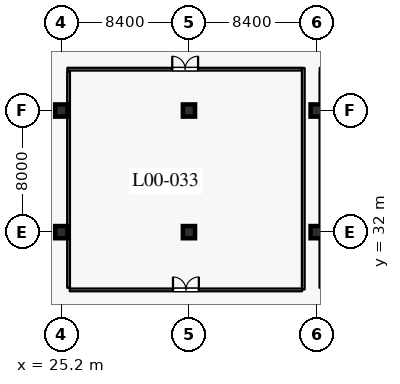
"""IFC4 building model, lengths in metres.
Left out: names, types, materials, properties, quantities, classifications, styles, units other than length and angle.
Written with IfcOpenShell. Run it as: python <this file> out.ifc"""

import sys

from ifc_helpers import new_model, si_unit, direction, frame, frame_2d, origin, origin_2d, place, context, subcontext, project, spatial, rectangle, extrude, element, fill, save


model = new_model("IFC4")
c1 = context("Model", 3, precision=1e-05, world=origin(), true_north=direction((0.0, 1.0)))
c2 = subcontext(c1, "Body", "Model", "MODEL_VIEW")
j1 = project(units=[si_unit("LENGTHUNIT", "METRE"), si_unit("PLANEANGLEUNIT", "RADIAN")], contexts=[c1])
p1 = place(None, origin())
s1 = spatial("IfcSite", under=j1, at=p1, CompositionType="ELEMENT")
p2 = place(p1, origin())
s2 = spatial("IfcBuilding", under=s1, at=p2, CompositionType="ELEMENT")
p3 = place(p2, origin())
s3 = spatial("IfcBuildingStorey", under=s2, at=p3, CompositionType="ELEMENT", Elevation=0.0)
for number, where, z_axis, x_axis in (
    (1, (25.2, 32.0, 0.0), (0.0, 0.0, 1.0), (1.0, 0.0, 0.0)),
    (2, (25.2, 40.0, 0.0), (0.0, 0.0, 1.0), (1.0, 0.0, 0.0)),
    (3, (33.6, 32.0, 0.0), (0.0, 0.0, 1.0), (1.0, 0.0, 0.0)),
    (4, (33.6, 40.0, 0.0), (0.0, 0.0, 1.0), (1.0, 0.0, 0.0)),
    (5, (42.0, 32.0, 0.0), (0.0, 0.0, 1.0), (1.0, 0.0, 0.0)),
    (6, (42.0, 40.0, 0.0), (0.0, 0.0, 1.0), (1.0, 0.0, 0.0)),
):
    element("IfcColumn", number, at=place(p3, frame(where, z_axis=z_axis, x_axis=x_axis)), inside=s3, PredefinedType="COLUMN", context=c2, shape_type="SweptSolid", body=[
        extrude(rectangle(XDim=0.8, YDim=0.8, at=origin_2d()), origin(), (0.0, 0.0, 1.0), 6.0),
    ])
p4 = place(p3, frame((25.76, 28.2, 0.0), z_axis=(0.0, 0.0, 1.0), x_axis=(1.0, 0.0, 0.0)))
e7 = element("IfcWall", 7, at=p4, inside=s3, PredefinedType="PARTITIONING", context=c2, shape_type="SweptSolid", body=[
    extrude(rectangle(XDim=15.28, YDim=0.18, at=frame_2d((7.64, 0.0))), origin(), (0.0, 0.0, 1.0), 5.675),
])
p5 = place(p4, frame((6.79, 0.0, 0.0)))
e8 = element("IfcOpeningElement", 8, at=p5, cuts=e7, PredefinedType="OPENING", context=c2, shape_type="SweptSolid", body=[
    extrude(rectangle(XDim=1.7, YDim=2.3, at=frame_2d((0.85, 1.15))), frame((0.0, 0.1, 0.0), z_axis=(0.0, -1.0, 0.0), x_axis=(1.0, 0.0, 0.0)), (0.0, 0.0, 1.0), 0.2),
])
for number, where, z_axis, x_axis in (
    (9, (25.68, 28.34, 0.0), (0.0, 0.0, 1.0), (0.0, 1.0, 0.0)),
    (10, (42.28, 28.34, 0.0), (0.0, 0.0, 1.0), (0.0, 1.0, 0.0)),
):
    element("IfcWall", number, at=place(p3, frame(where, z_axis=z_axis, x_axis=x_axis)), inside=s3, PredefinedType="PARTITIONING", context=c2, shape_type="SweptSolid", body=[
        extrude(rectangle(XDim=14.21, YDim=0.18, at=frame_2d((7.105, 0.0))), origin(), (0.0, 0.0, 1.0), 5.675),
    ])
p6 = place(p3, frame((41.12, 28.232, 0.0), z_axis=(0.0, 0.0, 1.0), x_axis=(0.0, 1.0, 0.0)))
e11 = element("IfcWall", 11, at=p6, inside=s3, PredefinedType="PARTITIONING", context=c2, shape_type="SweptSolid", body=[
    extrude(rectangle(XDim=14.568, YDim=0.18, at=frame_2d((7.284, 0.0))), origin(), (0.0, 0.0, 1.0), 5.675),
])
p7 = place(p3, frame((25.6, 42.72, 0.0), z_axis=(0.0, 0.0, 1.0), x_axis=(1.0, 0.0, 0.0)))
e12 = element("IfcWall", 12, at=p7, inside=s3, PredefinedType="PARTITIONING", context=c2, shape_type="SweptSolid", body=[
    extrude(rectangle(XDim=15.43, YDim=0.18, at=frame_2d((7.715, 0.0))), origin(), (0.0, 0.0, 1.0), 5.675),
])
p8 = place(p7, frame((6.9, 0.0, 0.0)))
e13 = element("IfcOpeningElement", 13, at=p8, cuts=e12, PredefinedType="OPENING", context=c2, shape_type="SweptSolid", body=[
    extrude(rectangle(XDim=1.7, YDim=2.3, at=frame_2d((0.85, 1.15))), frame((0.0, 0.1, 0.0), z_axis=(0.0, -1.0, 0.0), x_axis=(1.0, 0.0, 0.0)), (0.0, 0.0, 1.0), 0.2),
])
p9 = place(p5, origin())
e14 = element("IfcDoor", 14, at=p9, inside=s3, OperationType="DOUBLE_DOOR_SINGLE_SWING", PredefinedType="DOOR", context=c2, shape_type="SweptSolid", body=[
    extrude(rectangle(XDim=1.7, YDim=2.3, at=frame_2d((0.85, 1.15))), frame((0.0, 0.025, 0.0), z_axis=(0.0, -1.0, 0.0), x_axis=(1.0, 0.0, 0.0)), (0.0, 0.0, 1.0), 0.05),
])
fill(e8, e14)
p10 = place(p8, origin())
e15 = element("IfcDoor", 15, at=p10, inside=s3, OperationType="DOUBLE_DOOR_SINGLE_SWING", PredefinedType="DOOR", context=c2, shape_type="SweptSolid", body=[
    extrude(rectangle(XDim=1.7, YDim=2.3, at=frame_2d((0.85, 1.15))), frame((0.0, 0.025, 0.0), z_axis=(0.0, -1.0, 0.0), x_axis=(1.0, 0.0, 0.0)), (0.0, 0.0, 1.0), 0.05),
])
fill(e13, e15)
save(model, sys.argv[1])
